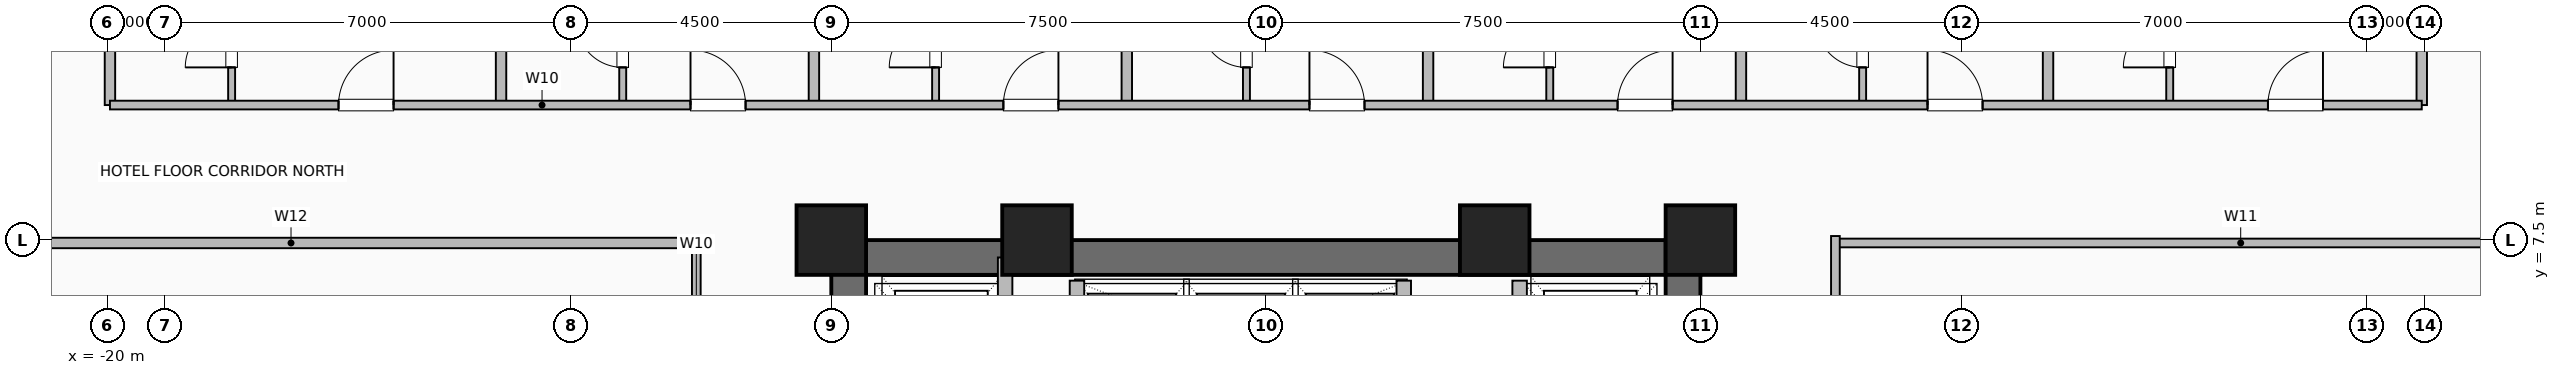
"""IFC4 building model, lengths in metres.
Left out: names, types, materials, properties, quantities, classifications, styles, units other than length and angle.
Written with IfcOpenShell. Run it as: python <this file> out.ifc"""

import sys

from ifc_helpers import new_model, si_unit, direction, frame, frame_2d, origin, origin_2d, place, context, subcontext, project, spatial, rectangle, hollow_rectangle, extrude, element, fill, save


model = new_model("IFC4")
c1 = context("Model", 3, precision=1e-05, world=origin(), true_north=direction((0.0, 1.0)))
c2 = subcontext(c1, "Body", "Model", "MODEL_VIEW")
j1 = project(units=[si_unit("LENGTHUNIT", "METRE"), si_unit("PLANEANGLEUNIT", "RADIAN")], contexts=[c1])
p1 = place(None, origin())
s1 = spatial("IfcSite", under=j1, at=p1, CompositionType="ELEMENT")
p2 = place(p1, origin())
s2 = spatial("IfcBuilding", under=s1, at=p2, CompositionType="ELEMENT")
p3 = place(p2, frame((0.0, 0.0, 30.5)))
s3 = spatial("IfcBuildingStorey", under=s2, at=p3, CompositionType="ELEMENT", Elevation=30.5)
for number, where, z_axis, x_axis in (
    (1, (7.5, 7.5, 0.0), (0.0, 0.0, 1.0), (1.0, 0.0, 0.0)),
    (2, (3.95, 7.5, 0.0), (0.0, 0.0, 1.0), (1.0, 0.0, 0.0)),
    (3, (-3.95, 7.5, 0.0), (0.0, 0.0, 1.0), (1.0, 0.0, 0.0)),
    (4, (-7.5, 7.5, 0.0), (0.0, 0.0, 1.0), (1.0, 0.0, 0.0)),
):
    element("IfcColumn", number, at=place(p3, frame(where, z_axis=z_axis, x_axis=x_axis)), inside=s3, PredefinedType="COLUMN", context=c2, shape_type="SweptSolid", body=[
        extrude(hollow_rectangle(XDim=1.2, YDim=1.2, WallThickness=0.055, at=origin_2d()), origin(), (0.0, 0.0, 1.0), 3.5),
    ])
p4 = place(p3, frame((-7.5, 7.2, 0.0), z_axis=(0.0, 0.0, 1.0), x_axis=(1.0, 0.0, 0.0)))
e5 = element("IfcWall", 5, at=p4, inside=s3, PredefinedType="SHEAR", context=c2, shape_type="SweptSolid", body=[
    extrude(rectangle(XDim=15.0, YDim=0.6, at=frame_2d((7.5, 0.0))), origin(), (0.0, 0.0, 1.0), 3.25),
])
p5 = place(p3, frame((-7.2, -7.5, 0.0), z_axis=(0.0, 0.0, 1.0), x_axis=(0.0, 1.0, 0.0)))
e6 = element("IfcWall", 6, at=p5, inside=s3, PredefinedType="SHEAR", context=c2, shape_type="SweptSolid", body=[
    extrude(rectangle(XDim=15.0, YDim=0.6, at=frame_2d((7.5, 0.0))), origin(), (0.0, 0.0, 1.0), 3.25),
])
p6 = place(p5, frame((9.5, 0.0, 0.0)))
e7 = element("IfcOpeningElement", 7, at=p6, cuts=e6, PredefinedType="OPENING", context=c2, shape_type="SweptSolid", body=[
    extrude(rectangle(XDim=1.0, YDim=2.08, at=frame_2d((0.5, 1.04))), frame((0.0, 0.31, 0.0), z_axis=(0.0, -1.0, 0.0), x_axis=(1.0, 0.0, 0.0)), (0.0, 0.0, 1.0), 0.62),
])
p7 = place(p3, frame((7.2, -7.5, 0.0), z_axis=(0.0, 0.0, 1.0), x_axis=(0.0, 1.0, 0.0)))
e8 = element("IfcWall", 8, at=p7, inside=s3, PredefinedType="SHEAR", context=c2, shape_type="SweptSolid", body=[
    extrude(rectangle(XDim=15.0, YDim=0.6, at=frame_2d((7.5, 0.0))), origin(), (0.0, 0.0, 1.0), 3.25),
])
for number, where, z_axis, x_axis in (
    (9, (-3.26, 4.58, 0.0), (0.0, 0.0, 1.0), (0.0, 1.0, 0.0)),
    (10, (2.38, 4.58, 0.0), (0.0, 0.0, 1.0), (0.0, 1.0, 0.0)),
):
    element("IfcWall", number, at=place(p3, frame(where, z_axis=z_axis, x_axis=x_axis)), inside=s3, PredefinedType="SHEAR", context=c2, shape_type="SweptSolid", body=[
        extrude(rectangle(XDim=2.22, YDim=0.25, at=frame_2d((1.11, 0.0))), origin(), (0.0, 0.0, 1.0), 3.25),
    ])
p8 = place(p3, frame((-4.5, 4.35, 0.0), z_axis=(0.0, 0.0, 1.0), x_axis=(0.0, 1.0, 0.0)))
e11 = element("IfcWall", 11, at=p8, inside=s3, PredefinedType="SHEAR", context=c2, shape_type="SweptSolid", body=[
    extrude(rectangle(XDim=2.85, YDim=0.25, at=frame_2d((1.425, 0.0))), origin(), (0.0, 0.0, 1.0), 3.25),
])
p9 = place(p3, frame((4.38, 4.3, 0.0), z_axis=(0.0, 0.0, 1.0), x_axis=(0.0, 1.0, 0.0)))
e12 = element("IfcWall", 12, at=p9, inside=s3, PredefinedType="SHEAR", context=c2, shape_type="SweptSolid", body=[
    extrude(rectangle(XDim=2.5, YDim=0.25, at=frame_2d((1.25, 0.0))), origin(), (0.0, 0.0, 1.0), 3.25),
])
p10 = place(p9, frame((0.8, 0.0, 0.0)))
e13 = element("IfcOpeningElement", 13, at=p10, cuts=e12, PredefinedType="OPENING", context=c2, shape_type="SweptSolid", body=[
    extrude(rectangle(XDim=1.2, YDim=2.2, at=frame_2d((0.6, 1.1))), frame((0.0, 0.135, 0.0), z_axis=(0.0, -1.0, 0.0), x_axis=(1.0, 0.0, 0.0)), (0.0, 0.0, 1.0), 0.27),
])
p11 = place(p3, frame((-17.85, 9.83, 0.0), z_axis=(0.0, 0.0, 1.0), x_axis=(0.0, 1.0, 0.0)))
e14 = element("IfcWall", 14, at=p11, inside=s3, PredefinedType="PLUMBINGWALL", context=c2, shape_type="SweptSolid", body=[
    extrude(rectangle(XDim=2.25, YDim=0.12, at=frame_2d((1.125, 0.0))), origin(), (0.0, 0.0, 1.0), 3.25),
])
p12 = place(p11, frame((0.65, 0.0, 0.0)))
e15 = element("IfcOpeningElement", 15, at=p12, cuts=e14, PredefinedType="OPENING", context=c2, shape_type="SweptSolid", body=[
    extrude(rectangle(XDim=0.8, YDim=2.05, at=frame_2d((0.4, 1.025))), frame((0.0, 0.07, 0.0), z_axis=(0.0, -1.0, 0.0), x_axis=(1.0, 0.0, 0.0)), (0.0, 0.0, 1.0), 0.14),
])
p13 = place(p3, frame((-11.1, 9.83, 0.0), z_axis=(0.0, 0.0, 1.0), x_axis=(0.0, 1.0, 0.0)))
e16 = element("IfcWall", 16, at=p13, inside=s3, PredefinedType="PLUMBINGWALL", context=c2, shape_type="SweptSolid", body=[
    extrude(rectangle(XDim=2.25, YDim=0.12, at=frame_2d((1.125, 0.0))), origin(), (0.0, 0.0, 1.0), 3.25),
])
p14 = place(p13, frame((0.65, 0.0, 0.0)))
e17 = element("IfcOpeningElement", 17, at=p14, cuts=e16, PredefinedType="OPENING", context=c2, shape_type="SweptSolid", body=[
    extrude(rectangle(XDim=0.8, YDim=2.05, at=frame_2d((0.4, 1.025))), frame((0.0, 0.07, 0.0), z_axis=(0.0, -1.0, 0.0), x_axis=(1.0, 0.0, 0.0)), (0.0, 0.0, 1.0), 0.14),
])
p15 = place(p3, frame((-5.7, 9.83, 0.0), z_axis=(0.0, 0.0, 1.0), x_axis=(0.0, 1.0, 0.0)))
e18 = element("IfcWall", 18, at=p15, inside=s3, PredefinedType="PLUMBINGWALL", context=c2, shape_type="SweptSolid", body=[
    extrude(rectangle(XDim=2.25, YDim=0.12, at=frame_2d((1.125, 0.0))), origin(), (0.0, 0.0, 1.0), 3.25),
])
p16 = place(p15, frame((0.65, 0.0, 0.0)))
e19 = element("IfcOpeningElement", 19, at=p16, cuts=e18, PredefinedType="OPENING", context=c2, shape_type="SweptSolid", body=[
    extrude(rectangle(XDim=0.8, YDim=2.05, at=frame_2d((0.4, 1.025))), frame((0.0, 0.07, 0.0), z_axis=(0.0, -1.0, 0.0), x_axis=(1.0, 0.0, 0.0)), (0.0, 0.0, 1.0), 0.14),
])
p17 = place(p3, frame((-0.335, 9.83, 0.0), z_axis=(0.0, 0.0, 1.0), x_axis=(0.0, 1.0, 0.0)))
e20 = element("IfcWall", 20, at=p17, inside=s3, PredefinedType="PLUMBINGWALL", context=c2, shape_type="SweptSolid", body=[
    extrude(rectangle(XDim=2.25, YDim=0.12, at=frame_2d((1.125, 0.0))), origin(), (0.0, 0.0, 1.0), 3.25),
])
p18 = place(p17, frame((0.65, 0.0, 0.0)))
e21 = element("IfcOpeningElement", 21, at=p18, cuts=e20, PredefinedType="OPENING", context=c2, shape_type="SweptSolid", body=[
    extrude(rectangle(XDim=0.8, YDim=2.05, at=frame_2d((0.4, 1.025))), frame((0.0, 0.07, 0.0), z_axis=(0.0, -1.0, 0.0), x_axis=(1.0, 0.0, 0.0)), (0.0, 0.0, 1.0), 0.14),
])
p19 = place(p3, frame((4.9, 9.83, 0.0), z_axis=(0.0, 0.0, 1.0), x_axis=(0.0, 1.0, 0.0)))
e22 = element("IfcWall", 22, at=p19, inside=s3, PredefinedType="PLUMBINGWALL", context=c2, shape_type="SweptSolid", body=[
    extrude(rectangle(XDim=2.25, YDim=0.12, at=frame_2d((1.125, 0.0))), origin(), (0.0, 0.0, 1.0), 3.25),
])
p20 = place(p19, frame((0.65, 0.0, 0.0)))
e23 = element("IfcOpeningElement", 23, at=p20, cuts=e22, PredefinedType="OPENING", context=c2, shape_type="SweptSolid", body=[
    extrude(rectangle(XDim=0.8, YDim=2.05, at=frame_2d((0.4, 1.025))), frame((0.0, 0.07, 0.0), z_axis=(0.0, -1.0, 0.0), x_axis=(1.0, 0.0, 0.0)), (0.0, 0.0, 1.0), 0.14),
])
p21 = place(p3, frame((10.3, 9.83, 0.0), z_axis=(0.0, 0.0, 1.0), x_axis=(0.0, 1.0, 0.0)))
e24 = element("IfcWall", 24, at=p21, inside=s3, PredefinedType="PLUMBINGWALL", context=c2, shape_type="SweptSolid", body=[
    extrude(rectangle(XDim=2.25, YDim=0.12, at=frame_2d((1.125, 0.0))), origin(), (0.0, 0.0, 1.0), 3.25),
])
p22 = place(p21, frame((0.65, 0.0, 0.0)))
e25 = element("IfcOpeningElement", 25, at=p22, cuts=e24, PredefinedType="OPENING", context=c2, shape_type="SweptSolid", body=[
    extrude(rectangle(XDim=0.8, YDim=2.05, at=frame_2d((0.4, 1.025))), frame((0.0, 0.07, 0.0), z_axis=(0.0, -1.0, 0.0), x_axis=(1.0, 0.0, 0.0)), (0.0, 0.0, 1.0), 0.14),
])
p23 = place(p3, frame((15.6, 9.83, 0.0), z_axis=(0.0, 0.0, 1.0), x_axis=(0.0, 1.0, 0.0)))
e26 = element("IfcWall", 26, at=p23, inside=s3, PredefinedType="PLUMBINGWALL", context=c2, shape_type="SweptSolid", body=[
    extrude(rectangle(XDim=2.25, YDim=0.12, at=frame_2d((1.125, 0.0))), origin(), (0.0, 0.0, 1.0), 3.25),
])
p24 = place(p23, frame((0.65, 0.0, 0.0)))
e27 = element("IfcOpeningElement", 27, at=p24, cuts=e26, PredefinedType="OPENING", context=c2, shape_type="SweptSolid", body=[
    extrude(rectangle(XDim=0.8, YDim=2.05, at=frame_2d((0.4, 1.025))), frame((0.0, 0.07, 0.0), z_axis=(0.0, -1.0, 0.0), x_axis=(1.0, 0.0, 0.0)), (0.0, 0.0, 1.0), 0.14),
])
for number, where, z_axis, x_axis in (
    (28, (-19.95, 9.83, 0.0), (0.0, 0.0, 1.0), (0.0, 1.0, 0.0)),
    (29, (-13.2, 9.83, 0.0), (0.0, 0.0, 1.0), (0.0, 1.0, 0.0)),
    (30, (-7.8, 9.83, 0.0), (0.0, 0.0, 1.0), (0.0, 1.0, 0.0)),
    (31, (-2.4, 9.83, 0.0), (0.0, 0.0, 1.0), (0.0, 1.0, 0.0)),
    (32, (2.8, 9.83, 0.0), (0.0, 0.0, 1.0), (0.0, 1.0, 0.0)),
    (33, (8.2, 9.83, 0.0), (0.0, 0.0, 1.0), (0.0, 1.0, 0.0)),
    (34, (13.5, 9.83, 0.0), (0.0, 0.0, 1.0), (0.0, 1.0, 0.0)),
    (35, (19.95, 9.83, 0.0), (0.0, 0.0, 1.0), (0.0, 1.0, 0.0)),
):
    element("IfcWall", number, at=place(p3, frame(where, z_axis=z_axis, x_axis=x_axis)), inside=s3, PredefinedType="PARTITIONING", context=c2, shape_type="SweptSolid", body=[
        extrude(rectangle(XDim=13.99, YDim=0.18, at=frame_2d((6.995, 0.0))), origin(), (0.0, 0.0, 1.0), 3.25),
    ])
p25 = place(p3, frame((-19.95, 9.83, 0.0), z_axis=(0.0, 0.0, 1.0), x_axis=(1.0, 0.0, 0.0)))
e36 = element("IfcWall", 36, at=p25, inside=s3, PredefinedType="PARTITIONING", context=c2, shape_type="SweptSolid", body=[
    extrude(rectangle(XDim=39.9, YDim=0.15, at=frame_2d((19.95, 0.0))), origin(), (0.0, 0.0, 1.0), 3.25),
])
p26 = place(p25, frame((3.945, 0.0, 0.0)))
e37 = element("IfcOpeningElement", 37, at=p26, cuts=e36, PredefinedType="OPENING", context=c2, shape_type="SweptSolid", body=[
    extrude(rectangle(XDim=0.95, YDim=2.08, at=frame_2d((0.475, 1.04))), frame((0.0, 0.085, 0.0), z_axis=(0.0, -1.0, 0.0), x_axis=(1.0, 0.0, 0.0)), (0.0, 0.0, 1.0), 0.17),
])
p27 = place(p25, frame((10.02, 0.0, 0.0)))
e38 = element("IfcOpeningElement", 38, at=p27, cuts=e36, PredefinedType="OPENING", context=c2, shape_type="SweptSolid", body=[
    extrude(rectangle(XDim=0.95, YDim=2.08, at=frame_2d((0.475, 1.04))), frame((0.0, 0.085, 0.0), z_axis=(0.0, -1.0, 0.0), x_axis=(1.0, 0.0, 0.0)), (0.0, 0.0, 1.0), 0.17),
])
p28 = place(p25, frame((15.42, 0.0, 0.0)))
e39 = element("IfcOpeningElement", 39, at=p28, cuts=e36, PredefinedType="OPENING", context=c2, shape_type="SweptSolid", body=[
    extrude(rectangle(XDim=0.95, YDim=2.08, at=frame_2d((0.475, 1.04))), frame((0.0, 0.085, 0.0), z_axis=(0.0, -1.0, 0.0), x_axis=(1.0, 0.0, 0.0)), (0.0, 0.0, 1.0), 0.17),
])
p29 = place(p25, frame((20.702, 0.0, 0.0)))
e40 = element("IfcOpeningElement", 40, at=p29, cuts=e36, PredefinedType="OPENING", context=c2, shape_type="SweptSolid", body=[
    extrude(rectangle(XDim=0.95, YDim=2.08, at=frame_2d((0.475, 1.04))), frame((0.0, 0.085, 0.0), z_axis=(0.0, -1.0, 0.0), x_axis=(1.0, 0.0, 0.0)), (0.0, 0.0, 1.0), 0.17),
])
p30 = place(p25, frame((26.02, 0.0, 0.0)))
e41 = element("IfcOpeningElement", 41, at=p30, cuts=e36, PredefinedType="OPENING", context=c2, shape_type="SweptSolid", body=[
    extrude(rectangle(XDim=0.95, YDim=2.08, at=frame_2d((0.475, 1.04))), frame((0.0, 0.085, 0.0), z_axis=(0.0, -1.0, 0.0), x_axis=(1.0, 0.0, 0.0)), (0.0, 0.0, 1.0), 0.17),
])
p31 = place(p25, frame((31.37, 0.0, 0.0)))
e42 = element("IfcOpeningElement", 42, at=p31, cuts=e36, PredefinedType="OPENING", context=c2, shape_type="SweptSolid", body=[
    extrude(rectangle(XDim=0.95, YDim=2.08, at=frame_2d((0.475, 1.04))), frame((0.0, 0.085, 0.0), z_axis=(0.0, -1.0, 0.0), x_axis=(1.0, 0.0, 0.0)), (0.0, 0.0, 1.0), 0.17),
])
p32 = place(p25, frame((37.245, 0.0, 0.0)))
e43 = element("IfcOpeningElement", 43, at=p32, cuts=e36, PredefinedType="OPENING", context=c2, shape_type="SweptSolid", body=[
    extrude(rectangle(XDim=0.95, YDim=2.08, at=frame_2d((0.475, 1.04))), frame((0.0, 0.085, 0.0), z_axis=(0.0, -1.0, 0.0), x_axis=(1.0, 0.0, 0.0)), (0.0, 0.0, 1.0), 0.17),
])
p33 = place(p3, frame((-23.82, 7.45, 0.0), z_axis=(0.0, 0.0, 1.0), x_axis=(1.0, 0.0, 0.0)))
e44 = element("IfcWall", 44, at=p33, inside=s3, PredefinedType="PARTITIONING", context=c2, shape_type="SweptSolid", body=[
    extrude(rectangle(XDim=13.99, YDim=0.18, at=frame_2d((6.995, 0.0))), origin(), (0.0, 0.0, 1.0), 3.25),
])
p34 = place(p3, frame((-9.83, -7.45, 0.0), z_axis=(0.0, 0.0, 1.0), x_axis=(0.0, 1.0, 0.0)))
e45 = element("IfcWall", 45, at=p34, inside=s3, PredefinedType="PARTITIONING", context=c2, shape_type="SweptSolid", body=[
    extrude(rectangle(XDim=14.9, YDim=0.15, at=frame_2d((7.45, 0.0))), origin(), (0.0, 0.0, 1.0), 3.25),
])
p35 = place(p34, frame((3.049, 0.0, 0.0)))
e46 = element("IfcOpeningElement", 46, at=p35, cuts=e45, PredefinedType="OPENING", context=c2, shape_type="SweptSolid", body=[
    extrude(rectangle(XDim=0.95, YDim=2.08, at=frame_2d((0.475, 1.04))), frame((0.0, 0.085, 0.0), z_axis=(0.0, -1.0, 0.0), x_axis=(1.0, 0.0, 0.0)), (0.0, 0.0, 1.0), 0.17),
])
p36 = place(p34, frame((7.927, 0.0, 0.0)))
e47 = element("IfcOpeningElement", 47, at=p36, cuts=e45, PredefinedType="OPENING", context=c2, shape_type="SweptSolid", body=[
    extrude(rectangle(XDim=0.95, YDim=2.08, at=frame_2d((0.475, 1.04))), frame((0.0, 0.085, 0.0), z_axis=(0.0, -1.0, 0.0), x_axis=(1.0, 0.0, 0.0)), (0.0, 0.0, 1.0), 0.17),
])
p37 = place(p34, frame((12.899, 0.0, 0.0)))
e48 = element("IfcOpeningElement", 48, at=p37, cuts=e45, PredefinedType="OPENING", context=c2, shape_type="SweptSolid", body=[
    extrude(rectangle(XDim=0.95, YDim=2.08, at=frame_2d((0.475, 1.04))), frame((0.0, 0.085, 0.0), z_axis=(0.0, -1.0, 0.0), x_axis=(1.0, 0.0, 0.0)), (0.0, 0.0, 1.0), 0.17),
])
p38 = place(p3, frame((9.83, 7.45, 0.0), z_axis=(0.0, 0.0, 1.0), x_axis=(1.0, 0.0, 0.0)))
e49 = element("IfcWall", 49, at=p38, inside=s3, PredefinedType="PARTITIONING", context=c2, shape_type="SweptSolid", body=[
    extrude(rectangle(XDim=13.99, YDim=0.15, at=frame_2d((6.995, 0.0))), origin(), (0.0, 0.0, 1.0), 3.25),
])
p39 = place(p3, frame((9.83, -7.57, 0.0), z_axis=(0.0, 0.0, 1.0), x_axis=(0.0, 1.0, 0.0)))
e50 = element("IfcWall", 50, at=p39, inside=s3, PredefinedType="PARTITIONING", context=c2, shape_type="SweptSolid", body=[
    extrude(rectangle(XDim=15.14, YDim=0.15, at=frame_2d((7.57, 0.0))), origin(), (0.0, 0.0, 1.0), 3.25),
])
p40 = place(p39, frame((1.62, 0.0, 0.0)))
e51 = element("IfcOpeningElement", 51, at=p40, cuts=e50, PredefinedType="OPENING", context=c2, shape_type="SweptSolid", body=[
    extrude(rectangle(XDim=0.95, YDim=2.06, at=frame_2d((0.475, 1.03))), frame((0.0, 0.085, 0.0), z_axis=(0.0, -1.0, 0.0), x_axis=(1.0, 0.0, 0.0)), (0.0, 0.0, 1.0), 0.17),
])
p41 = place(p39, frame((4.645, 0.0, 0.0)))
e52 = element("IfcOpeningElement", 52, at=p41, cuts=e50, PredefinedType="OPENING", context=c2, shape_type="SweptSolid", body=[
    extrude(rectangle(XDim=0.85, YDim=2.05, at=frame_2d((0.425, 1.025))), frame((0.0, 0.085, 0.0), z_axis=(0.0, -1.0, 0.0), x_axis=(1.0, 0.0, 0.0)), (0.0, 0.0, 1.0), 0.17),
])
p42 = place(p39, frame((7.745, 0.0, 0.0)))
e53 = element("IfcOpeningElement", 53, at=p42, cuts=e50, PredefinedType="OPENING", context=c2, shape_type="SweptSolid", body=[
    extrude(rectangle(XDim=0.95, YDim=2.06, at=frame_2d((0.475, 1.03))), frame((0.0, 0.085, 0.0), z_axis=(0.0, -1.0, 0.0), x_axis=(1.0, 0.0, 0.0)), (0.0, 0.0, 1.0), 0.17),
])
p43 = place(p39, frame((12.22, 0.0, 0.0)))
e54 = element("IfcOpeningElement", 54, at=p43, cuts=e50, PredefinedType="OPENING", context=c2, shape_type="SweptSolid", body=[
    extrude(rectangle(XDim=0.95, YDim=2.06, at=frame_2d((0.475, 1.03))), frame((0.0, 0.085, 0.0), z_axis=(0.0, -1.0, 0.0), x_axis=(1.0, 0.0, 0.0)), (0.0, 0.0, 1.0), 0.17),
])
p44 = place(p12, origin())
e55 = element("IfcDoor", 55, at=p44, inside=s3, OperationType="SINGLE_SWING_LEFT", PredefinedType="DOOR", context=c2, shape_type="SweptSolid", body=[
    extrude(rectangle(XDim=0.8, YDim=2.05, at=frame_2d((0.4, 1.025))), frame((0.0, 0.025, 0.0), z_axis=(0.0, -1.0, 0.0), x_axis=(1.0, 0.0, 0.0)), (0.0, 0.0, 1.0), 0.05),
])
fill(e15, e55)
p45 = place(p14, origin())
e56 = element("IfcDoor", 56, at=p45, inside=s3, OperationType="SINGLE_SWING_RIGHT", PredefinedType="DOOR", context=c2, shape_type="SweptSolid", body=[
    extrude(rectangle(XDim=0.8, YDim=2.05, at=frame_2d((0.4, 1.025))), frame((0.0, 0.025, 0.0), z_axis=(0.0, -1.0, 0.0), x_axis=(1.0, 0.0, 0.0)), (0.0, 0.0, 1.0), 0.05),
])
fill(e17, e56)
p46 = place(p16, origin())
e57 = element("IfcDoor", 57, at=p46, inside=s3, OperationType="SINGLE_SWING_LEFT", PredefinedType="DOOR", context=c2, shape_type="SweptSolid", body=[
    extrude(rectangle(XDim=0.8, YDim=2.05, at=frame_2d((0.4, 1.025))), frame((0.0, 0.025, 0.0), z_axis=(0.0, -1.0, 0.0), x_axis=(1.0, 0.0, 0.0)), (0.0, 0.0, 1.0), 0.05),
])
fill(e19, e57)
p47 = place(p18, origin())
e58 = element("IfcDoor", 58, at=p47, inside=s3, OperationType="SINGLE_SWING_RIGHT", PredefinedType="DOOR", context=c2, shape_type="SweptSolid", body=[
    extrude(rectangle(XDim=0.8, YDim=2.05, at=frame_2d((0.4, 1.025))), frame((0.0, 0.025, 0.0), z_axis=(0.0, -1.0, 0.0), x_axis=(1.0, 0.0, 0.0)), (0.0, 0.0, 1.0), 0.05),
])
fill(e21, e58)
p48 = place(p20, origin())
e59 = element("IfcDoor", 59, at=p48, inside=s3, OperationType="SINGLE_SWING_LEFT", PredefinedType="DOOR", context=c2, shape_type="SweptSolid", body=[
    extrude(rectangle(XDim=0.8, YDim=2.05, at=frame_2d((0.4, 1.025))), frame((0.0, 0.025, 0.0), z_axis=(0.0, -1.0, 0.0), x_axis=(1.0, 0.0, 0.0)), (0.0, 0.0, 1.0), 0.05),
])
fill(e23, e59)
p49 = place(p22, origin())
e60 = element("IfcDoor", 60, at=p49, inside=s3, OperationType="SINGLE_SWING_RIGHT", PredefinedType="DOOR", context=c2, shape_type="SweptSolid", body=[
    extrude(rectangle(XDim=0.8, YDim=2.05, at=frame_2d((0.4, 1.025))), frame((0.0, 0.025, 0.0), z_axis=(0.0, -1.0, 0.0), x_axis=(1.0, 0.0, 0.0)), (0.0, 0.0, 1.0), 0.05),
])
fill(e25, e60)
p50 = place(p24, origin())
e61 = element("IfcDoor", 61, at=p50, inside=s3, OperationType="SINGLE_SWING_LEFT", PredefinedType="DOOR", context=c2, shape_type="SweptSolid", body=[
    extrude(rectangle(XDim=0.8, YDim=2.05, at=frame_2d((0.4, 1.025))), frame((0.0, 0.025, 0.0), z_axis=(0.0, -1.0, 0.0), x_axis=(1.0, 0.0, 0.0)), (0.0, 0.0, 1.0), 0.05),
])
fill(e27, e61)
p51 = place(p26, origin())
e62 = element("IfcDoor", 62, at=p51, inside=s3, OperationType="SINGLE_SWING_RIGHT", PredefinedType="DOOR", context=c2, shape_type="SweptSolid", body=[
    extrude(rectangle(XDim=0.95, YDim=2.08, at=frame_2d((0.475, 1.04))), frame((0.0, 0.025, 0.0), z_axis=(0.0, -1.0, 0.0), x_axis=(1.0, 0.0, 0.0)), (0.0, 0.0, 1.0), 0.05),
])
fill(e37, e62)
p52 = place(p27, origin())
e63 = element("IfcDoor", 63, at=p52, inside=s3, OperationType="SINGLE_SWING_LEFT", PredefinedType="DOOR", context=c2, shape_type="SweptSolid", body=[
    extrude(rectangle(XDim=0.95, YDim=2.08, at=frame_2d((0.475, 1.04))), frame((0.0, 0.025, 0.0), z_axis=(0.0, -1.0, 0.0), x_axis=(1.0, 0.0, 0.0)), (0.0, 0.0, 1.0), 0.05),
])
fill(e38, e63)
p53 = place(p28, origin())
e64 = element("IfcDoor", 64, at=p53, inside=s3, OperationType="SINGLE_SWING_RIGHT", PredefinedType="DOOR", context=c2, shape_type="SweptSolid", body=[
    extrude(rectangle(XDim=0.95, YDim=2.08, at=frame_2d((0.475, 1.04))), frame((0.0, 0.025, 0.0), z_axis=(0.0, -1.0, 0.0), x_axis=(1.0, 0.0, 0.0)), (0.0, 0.0, 1.0), 0.05),
])
fill(e39, e64)
p54 = place(p29, origin())
e65 = element("IfcDoor", 65, at=p54, inside=s3, OperationType="SINGLE_SWING_LEFT", PredefinedType="DOOR", context=c2, shape_type="SweptSolid", body=[
    extrude(rectangle(XDim=0.95, YDim=2.08, at=frame_2d((0.475, 1.04))), frame((0.0, 0.025, 0.0), z_axis=(0.0, -1.0, 0.0), x_axis=(1.0, 0.0, 0.0)), (0.0, 0.0, 1.0), 0.05),
])
fill(e40, e65)
p55 = place(p30, origin())
e66 = element("IfcDoor", 66, at=p55, inside=s3, OperationType="SINGLE_SWING_RIGHT", PredefinedType="DOOR", context=c2, shape_type="SweptSolid", body=[
    extrude(rectangle(XDim=0.95, YDim=2.08, at=frame_2d((0.475, 1.04))), frame((0.0, 0.025, 0.0), z_axis=(0.0, -1.0, 0.0), x_axis=(1.0, 0.0, 0.0)), (0.0, 0.0, 1.0), 0.05),
])
fill(e41, e66)
p56 = place(p31, origin())
e67 = element("IfcDoor", 67, at=p56, inside=s3, OperationType="SINGLE_SWING_LEFT", PredefinedType="DOOR", context=c2, shape_type="SweptSolid", body=[
    extrude(rectangle(XDim=0.95, YDim=2.08, at=frame_2d((0.475, 1.04))), frame((0.0, 0.025, 0.0), z_axis=(0.0, -1.0, 0.0), x_axis=(1.0, 0.0, 0.0)), (0.0, 0.0, 1.0), 0.05),
])
fill(e42, e67)
p57 = place(p32, origin())
e68 = element("IfcDoor", 68, at=p57, inside=s3, OperationType="SINGLE_SWING_RIGHT", PredefinedType="DOOR", context=c2, shape_type="SweptSolid", body=[
    extrude(rectangle(XDim=0.95, YDim=2.08, at=frame_2d((0.475, 1.04))), frame((0.0, 0.025, 0.0), z_axis=(0.0, -1.0, 0.0), x_axis=(1.0, 0.0, 0.0)), (0.0, 0.0, 1.0), 0.05),
])
fill(e43, e68)
save(model, sys.argv[1])
